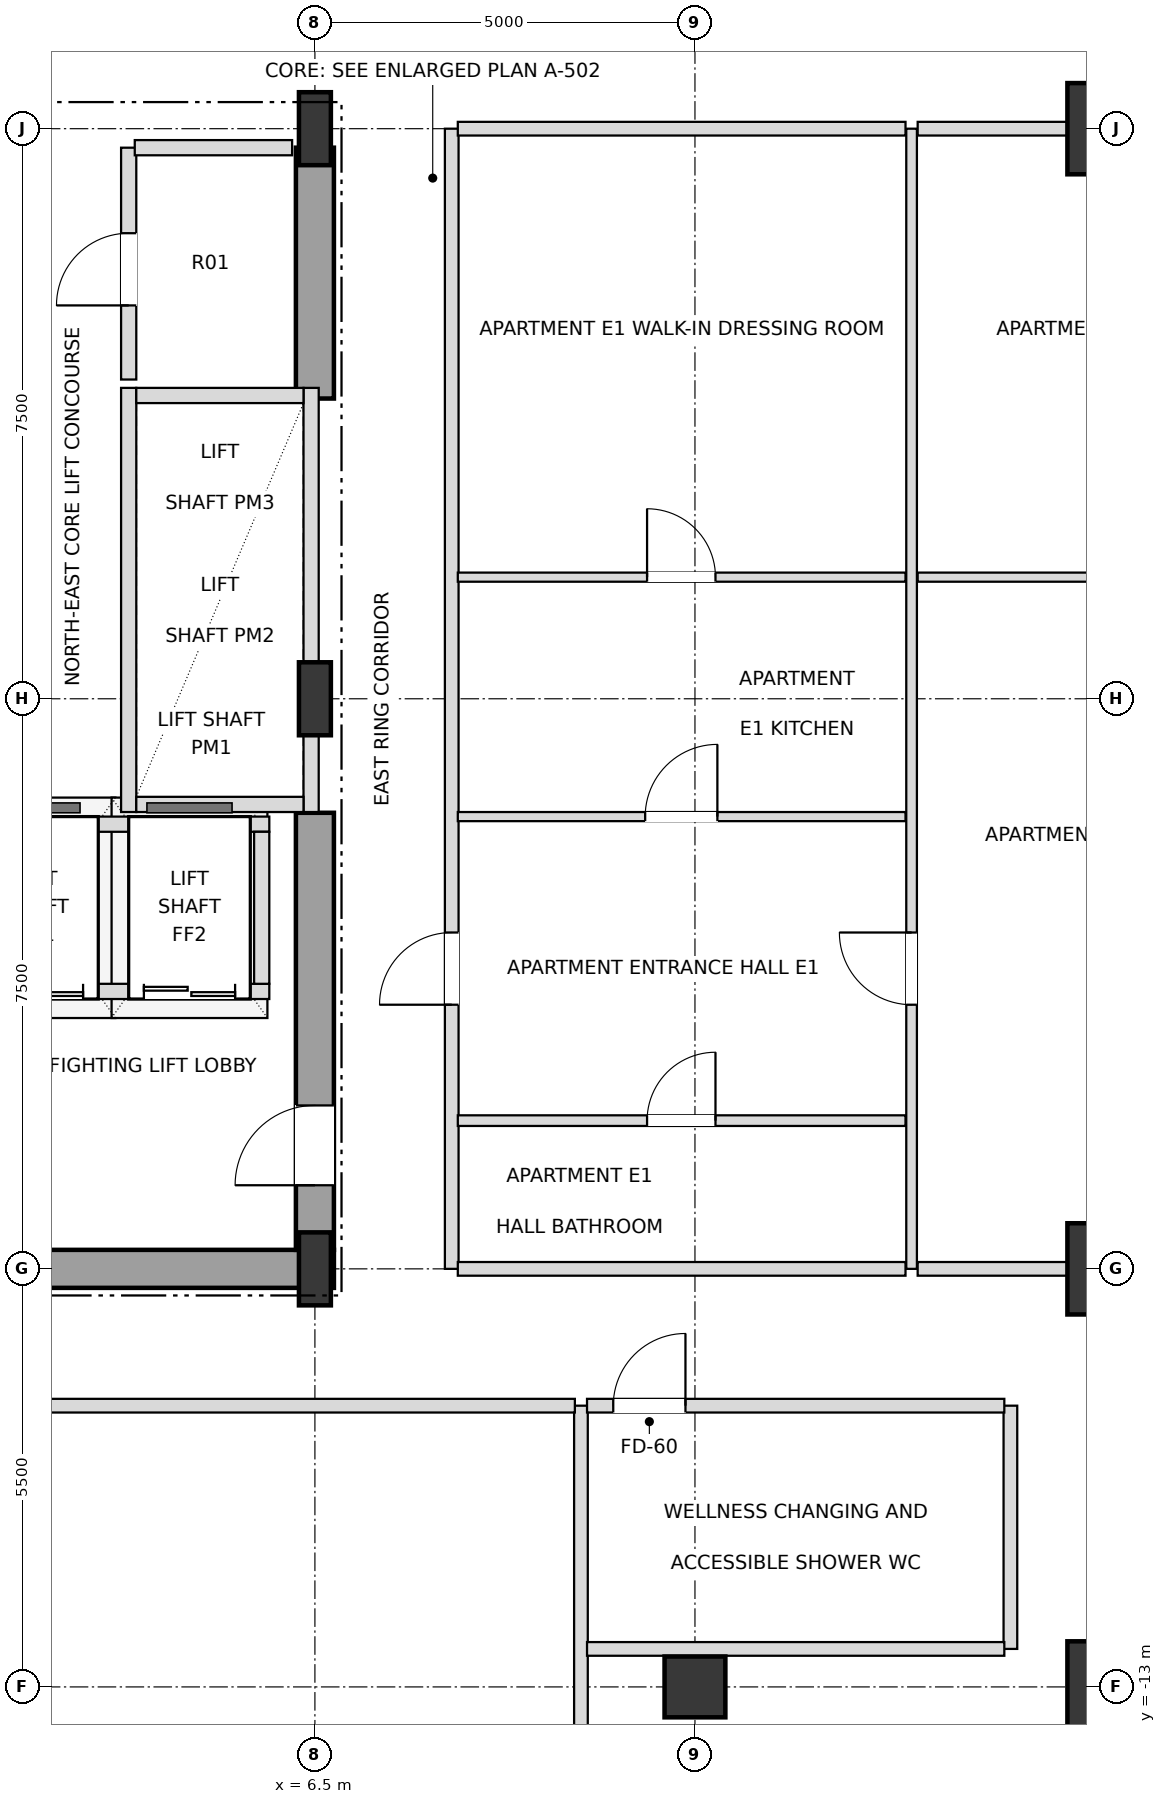
"""IFC4 building model, lengths in metres.
Left out: names, types, materials, properties, quantities, classifications, styles, units other than length and angle.
Written with IfcOpenShell. Run it as: python <this file> out.ifc"""

import sys

from ifc_helpers import new_model, si_unit, direction, frame, frame_2d, origin, origin_2d, place, context, subcontext, project, spatial, rectangle, i_section, extrude, element, fill, save


model = new_model("IFC4")
c1 = context("Model", 3, precision=1e-05, world=origin(), true_north=direction((0.0, 1.0)))
c2 = subcontext(c1, "Body", "Model", "MODEL_VIEW")
j1 = project(units=[si_unit("LENGTHUNIT", "METRE"), si_unit("PLANEANGLEUNIT", "RADIAN")], contexts=[c1])
p1 = place(None, origin())
s1 = spatial("IfcSite", under=j1, at=p1, CompositionType="ELEMENT")
p2 = place(p1, origin())
s2 = spatial("IfcBuilding", under=s1, at=p2, CompositionType="ELEMENT")
p3 = place(p2, frame((0.0, 0.0, 106.2)))
s3 = spatial("IfcBuildingStorey", under=s2, at=p3, CompositionType="ELEMENT", Elevation=106.2)
for number, where, z_axis, x_axis in (
    (1, (6.5, -7.5, 0.0), (0.0, 0.0, 1.0), (1.0, 0.0, 0.0)),
    (2, (6.5, 0.0, 0.0), (0.0, 0.0, 1.0), (1.0, 0.0, 0.0)),
    (3, (6.5, 7.5, 0.0), (0.0, 0.0, 1.0), (1.0, 0.0, 0.0)),
):
    element("IfcColumn", number, at=place(p3, frame(where, z_axis=z_axis, x_axis=x_axis)), inside=s3, PredefinedType="COLUMN", context=c2, shape_type="SweptSolid", body=[
        extrude(i_section(OverallWidth=0.42, OverallDepth=0.96, WebThickness=0.022, FlangeThickness=0.034, at=origin_2d()), origin(), (0.0, 0.0, 1.0), 3.6),
    ])
for number, where, z_axis, x_axis in (
    (4, (17.0, -13.0, 0.0), (0.0, 0.0, 1.0), (1.0, 0.0, 0.0)),
    (5, (17.0, -7.5, 0.0), (0.0, 0.0, 1.0), (1.0, 0.0, 0.0)),
    (6, (17.0, 7.5, 0.0), (0.0, 0.0, 1.0), (1.0, 0.0, 0.0)),
):
    element("IfcColumn", number, at=place(p3, frame(where, z_axis=z_axis, x_axis=x_axis)), inside=s3, PredefinedType="USERDEFINED", context=c2, shape_type="SweptSolid", body=[
        extrude(rectangle(XDim=1.2, YDim=1.2, at=origin_2d()), origin(), (0.0, 0.0, 1.0), 3.6),
    ])
p4 = place(p3, frame((11.5, -13.0, 0.0), z_axis=(0.0, 0.0, 1.0), x_axis=(1.0, 0.0, 0.0)))
e7 = element("IfcColumn", 7, at=p4, inside=s3, PredefinedType="COLUMN", context=c2, shape_type="SweptSolid", body=[
    extrude(rectangle(XDim=0.8, YDim=0.8, at=origin_2d()), origin(), (0.0, 0.0, 1.0), 3.6),
])
p5 = place(p3, frame((0.0, -7.5, 0.0), z_axis=(0.0, 0.0, 1.0), x_axis=(1.0, 0.0, 0.0)))
e8 = element("IfcWall", 8, at=p5, inside=s3, PredefinedType="SHEAR", context=c2, shape_type="SweptSolid", body=[
    extrude(rectangle(XDim=6.75, YDim=0.5, at=frame_2d((3.375, 0.0))), origin(), (0.0, 0.0, 1.0), 3.38),
])
p6 = place(p3, frame((6.5, -7.25, 0.0), z_axis=(0.0, 0.0, 1.0), x_axis=(0.0, 1.0, 0.0)))
e9 = element("IfcWall", 9, at=p6, inside=s3, PredefinedType="SHEAR", context=c2, shape_type="SweptSolid", body=[
    extrude(rectangle(XDim=5.75, YDim=0.5, at=frame_2d((2.875, 0.0))), origin(), (0.0, 0.0, 1.0), 3.38),
])
p7 = place(p6, frame((0.85, 0.0, 0.0)))
e10 = element("IfcOpeningElement", 10, at=p7, cuts=e9, PredefinedType="OPENING", context=c2, shape_type="SweptSolid", body=[
    extrude(rectangle(XDim=1.05, YDim=2.15, at=frame_2d((0.525, 1.075))), frame((0.0, 0.26, 0.0), z_axis=(0.0, -1.0, 0.0), x_axis=(1.0, 0.0, 0.0)), (0.0, 0.0, 1.0), 0.52),
])
p8 = place(p3, frame((6.5, 3.95, 0.0), z_axis=(0.0, 0.0, 1.0), x_axis=(0.0, 1.0, 0.0)))
e11 = element("IfcWall", 11, at=p8, inside=s3, PredefinedType="SHEAR", context=c2, shape_type="SweptSolid", body=[
    extrude(rectangle(XDim=3.3, YDim=0.5, at=frame_2d((1.65, 0.0))), origin(), (0.0, 0.0, 1.0), 3.38),
])
p9 = place(p3, frame((4.05, -1.49, 0.0), z_axis=(0.0, 0.0, 1.0), x_axis=(0.0, 1.0, 0.0)))
e12 = element("IfcWall", 12, at=p9, inside=s3, PredefinedType="SOLIDWALL", context=c2, shape_type="SweptSolid", body=[
    extrude(rectangle(XDim=5.58, YDim=0.2, at=frame_2d((2.79, 0.0))), origin(), (0.0, 0.0, 1.0), 3.38),
])
p10 = place(p3, frame((6.45, -1.49, 0.0), z_axis=(0.0, 0.0, 1.0), x_axis=(0.0, 1.0, 0.0)))
e13 = element("IfcWall", 13, at=p10, inside=s3, PredefinedType="SOLIDWALL", context=c2, shape_type="SweptSolid", body=[
    extrude(rectangle(XDim=5.58, YDim=0.2, at=frame_2d((2.79, 0.0))), origin(), (0.0, 0.0, 1.0), 2.816),
])
for number, where, z_axis, x_axis in (
    (14, (4.15, -1.39, 0.0), (0.0, 0.0, 1.0), (1.0, 0.0, 0.0)),
    (15, (4.15, 3.99, 0.0), (0.0, 0.0, 1.0), (1.0, 0.0, 0.0)),
):
    element("IfcWall", number, at=place(p3, frame(where, z_axis=z_axis, x_axis=x_axis)), inside=s3, PredefinedType="SOLIDWALL", context=c2, shape_type="SweptSolid", body=[
        extrude(rectangle(XDim=2.2, YDim=0.2, at=frame_2d((1.1, 0.0))), origin(), (0.0, 0.0, 1.0), 3.38),
    ])
p11 = place(p3, frame((1.8, -3.85, 0.0), z_axis=(0.0, 0.0, 1.0), x_axis=(1.0, 0.0, 0.0)))
e16 = element("IfcWall", 16, at=p11, inside=s3, PredefinedType="SOLIDWALL", context=c2, shape_type="SweptSolid", body=[
    extrude(rectangle(XDim=4.1, YDim=0.2, at=frame_2d((2.05, 0.0))), origin(), (0.0, 0.0, 1.0), 3.38),
])
p12 = place(p11, frame((0.45, 0.0, 0.0)))
e17 = element("IfcOpeningElement", 17, at=p12, cuts=e16, PredefinedType="OPENING", context=c2, shape_type="SweptSolid", body=[
    extrude(rectangle(XDim=1.2, YDim=2.2, at=frame_2d((0.6, 1.1))), frame((0.0, 0.11, 0.0), z_axis=(0.0, -1.0, 0.0), x_axis=(1.0, 0.0, 0.0)), (0.0, 0.0, 1.0), 0.22),
])
p13 = place(p11, frame((2.45, 0.0, 0.0)))
e18 = element("IfcOpeningElement", 18, at=p13, cuts=e16, PredefinedType="OPENING", context=c2, shape_type="SweptSolid", body=[
    extrude(rectangle(XDim=1.2, YDim=2.2, at=frame_2d((0.6, 1.1))), frame((0.0, 0.11, 0.0), z_axis=(0.0, -1.0, 0.0), x_axis=(1.0, 0.0, 0.0)), (0.0, 0.0, 1.0), 0.22),
])
p14 = place(p3, frame((1.8, -1.65, 0.0), z_axis=(0.0, 0.0, 1.0), x_axis=(1.0, 0.0, 0.0)))
e19 = element("IfcWall", 19, at=p14, inside=s3, PredefinedType="SOLIDWALL", context=c2, shape_type="SweptSolid", body=[
    extrude(rectangle(XDim=4.1, YDim=0.2, at=frame_2d((2.05, 0.0))), origin(), (0.0, 0.0, 1.0), 3.38),
])
p15 = place(p3, frame((5.8, -3.75, 0.0), z_axis=(0.0, 0.0, 1.0), x_axis=(0.0, 1.0, 0.0)))
e20 = element("IfcWall", 20, at=p15, inside=s3, PredefinedType="SOLIDWALL", context=c2, shape_type="SweptSolid", body=[
    extrude(rectangle(XDim=2.0, YDim=0.2, at=frame_2d((1.0, 0.0))), origin(), (0.0, 0.0, 1.0), 3.38),
])
p16 = place(p3, frame((4.05, 4.2, 0.0), z_axis=(0.0, 0.0, 1.0), x_axis=(0.0, 1.0, 0.0)))
e21 = element("IfcWall", 21, at=p16, inside=s3, PredefinedType="SOLIDWALL", context=c2, shape_type="SweptSolid", body=[
    extrude(rectangle(XDim=3.05, YDim=0.2, at=frame_2d((1.525, 0.0))), origin(), (0.0, 0.0, 1.0), 3.38),
])
p17 = place(p16, frame((0.975, 0.0, 0.0)))
e22 = element("IfcOpeningElement", 22, at=p17, cuts=e21, PredefinedType="OPENING", context=c2, shape_type="SweptSolid", body=[
    extrude(rectangle(XDim=0.95, YDim=2.15, at=frame_2d((0.475, 1.075))), frame((0.0, 0.11, 0.0), z_axis=(0.0, -1.0, 0.0), x_axis=(1.0, 0.0, 0.0)), (0.0, 0.0, 1.0), 0.22),
])
p18 = place(p3, frame((8.3, -7.5, 0.0), z_axis=(0.0, 0.0, 1.0), x_axis=(0.0, 1.0, 0.0)))
e23 = element("IfcWall", 23, at=p18, inside=s3, PredefinedType="PARTITIONING", context=c2, shape_type="SweptSolid", body=[
    extrude(rectangle(XDim=15.0, YDim=0.18, at=frame_2d((7.5, 0.0))), origin(), (0.0, 0.0, 1.0), 3.38),
])
p19 = place(p18, frame((3.475, 0.0, 0.0)))
e24 = element("IfcOpeningElement", 24, at=p19, cuts=e23, PredefinedType="OPENING", context=c2, shape_type="SweptSolid", body=[
    extrude(rectangle(XDim=0.95, YDim=2.15, at=frame_2d((0.475, 1.075))), frame((0.0, 0.1, 0.0), z_axis=(0.0, -1.0, 0.0), x_axis=(1.0, 0.0, 0.0)), (0.0, 0.0, 1.0), 0.2),
])
p20 = place(p3, frame((10.0, -23.15, 0.0), z_axis=(0.0, 0.0, 1.0), x_axis=(0.0, 1.0, 0.0)))
e25 = element("IfcWall", 25, at=p20, inside=s3, PredefinedType="PARTITIONING", context=c2, shape_type="SweptSolid", body=[
    extrude(rectangle(XDim=13.85, YDim=0.18, at=frame_2d((6.925, 0.0))), origin(), (0.0, 0.0, 1.0), 2.816),
])
p21 = place(p20, frame((4.855, 0.0, 0.0)))
e26 = element("IfcOpeningElement", 26, at=p21, cuts=e25, PredefinedType="OPENING", context=c2, shape_type="SweptSolid", body=[
    extrude(rectangle(XDim=0.95, YDim=2.15, at=frame_2d((0.475, 1.075))), frame((0.0, 0.1, 0.0), z_axis=(0.0, -1.0, 0.0), x_axis=(1.0, 0.0, 0.0)), (0.0, 0.0, 1.0), 0.2),
])
p22 = place(p3, frame((14.35, -7.5, 0.0), z_axis=(0.0, 0.0, 1.0), x_axis=(0.0, 1.0, 0.0)))
e27 = element("IfcWall", 27, at=p22, inside=s3, PredefinedType="PARTITIONING", context=c2, shape_type="SweptSolid", body=[
    extrude(rectangle(XDim=15.0, YDim=0.14, at=frame_2d((7.5, 0.0))), origin(), (0.0, 0.0, 1.0), 3.38),
])
p23 = place(p22, frame((3.475, 0.0, 0.0)))
e28 = element("IfcOpeningElement", 28, at=p23, cuts=e27, PredefinedType="OPENING", context=c2, shape_type="SweptSolid", body=[
    extrude(rectangle(XDim=0.95, YDim=2.1, at=frame_2d((0.475, 1.05))), frame((0.0, 0.08, 0.0), z_axis=(0.0, -1.0, 0.0), x_axis=(1.0, 0.0, 0.0)), (0.0, 0.0, 1.0), 0.16),
])
p24 = place(p3, frame((15.65, -12.5, 0.0), z_axis=(0.0, 0.0, 1.0), x_axis=(0.0, 1.0, 0.0)))
e29 = element("IfcWall", 29, at=p24, inside=s3, PredefinedType="PARTITIONING", context=c2, shape_type="SweptSolid", body=[
    extrude(rectangle(XDim=3.2, YDim=0.18, at=frame_2d((1.6, 0.0))), origin(), (0.0, 0.0, 1.0), 3.38),
])
p25 = place(p3, frame((10.08, -12.5, 0.0), z_axis=(0.0, 0.0, 1.0), x_axis=(1.0, 0.0, 0.0)))
e30 = element("IfcWall", 30, at=p25, inside=s3, PredefinedType="PARTITIONING", context=c2, shape_type="SweptSolid", body=[
    extrude(rectangle(XDim=5.49, YDim=0.18, at=frame_2d((2.745, 0.0))), origin(), (0.0, 0.0, 1.0), 3.38),
])
p26 = place(p3, frame((-4.92, -9.3, 0.0), z_axis=(0.0, 0.0, 1.0), x_axis=(1.0, 0.0, 0.0)))
e31 = element("IfcWall", 31, at=p26, inside=s3, PredefinedType="PARTITIONING", context=c2, shape_type="SweptSolid", body=[
    extrude(rectangle(XDim=14.84, YDim=0.18, at=frame_2d((7.42, 0.0))), origin(), (0.0, 0.0, 1.0), 2.816),
])
p27 = place(p26, frame((6.945, 0.0, 0.0)))
e32 = element("IfcOpeningElement", 32, at=p27, cuts=e31, PredefinedType="OPENING", context=c2, shape_type="SweptSolid", body=[
    extrude(rectangle(XDim=0.95, YDim=2.15, at=frame_2d((0.475, 1.075))), frame((0.0, 0.1, 0.0), z_axis=(0.0, -1.0, 0.0), x_axis=(1.0, 0.0, 0.0)), (0.0, 0.0, 1.0), 0.2),
])
p28 = place(p3, frame((10.08, -9.3, 0.0), z_axis=(0.0, 0.0, 1.0), x_axis=(1.0, 0.0, 0.0)))
e33 = element("IfcWall", 33, at=p28, inside=s3, PredefinedType="PARTITIONING", context=c2, shape_type="SweptSolid", body=[
    extrude(rectangle(XDim=5.49, YDim=0.18, at=frame_2d((2.745, 0.0))), origin(), (0.0, 0.0, 1.0), 3.38),
])
p29 = place(p28, frame((0.345, 0.0, 0.0)))
e34 = element("IfcOpeningElement", 34, at=p29, cuts=e33, PredefinedType="OPENING", context=c2, shape_type="SweptSolid", body=[
    extrude(rectangle(XDim=0.95, YDim=2.15, at=frame_2d((0.475, 1.075))), frame((0.0, 0.1, 0.0), z_axis=(0.0, -1.0, 0.0), x_axis=(1.0, 0.0, 0.0)), (0.0, 0.0, 1.0), 0.2),
])
p30 = place(p3, frame((8.38, -7.5, 0.0), z_axis=(0.0, 0.0, 1.0), x_axis=(1.0, 0.0, 0.0)))
e35 = element("IfcWall", 35, at=p30, inside=s3, PredefinedType="PARTITIONING", context=c2, shape_type="SweptSolid", body=[
    extrude(rectangle(XDim=5.89, YDim=0.18, at=frame_2d((2.945, 0.0))), origin(), (0.0, 0.0, 1.0), 2.816),
])
p31 = place(p3, frame((14.43, -7.5, 0.0), z_axis=(0.0, 0.0, 1.0), x_axis=(1.0, 0.0, 0.0)))
e36 = element("IfcWall", 36, at=p31, inside=s3, PredefinedType="PARTITIONING", context=c2, shape_type="SweptSolid", body=[
    extrude(rectangle(XDim=5.72, YDim=0.18, at=frame_2d((2.86, 0.0))), origin(), (0.0, 0.0, 1.0), 2.816),
])
p32 = place(p3, frame((8.38, -5.55, 0.0), z_axis=(0.0, 0.0, 1.0), x_axis=(1.0, 0.0, 0.0)))
e37 = element("IfcWall", 37, at=p32, inside=s3, PredefinedType="PARTITIONING", context=c2, shape_type="SweptSolid", body=[
    extrude(rectangle(XDim=5.89, YDim=0.14, at=frame_2d((2.945, 0.0))), origin(), (0.0, 0.0, 1.0), 3.38),
])
p33 = place(p32, frame((2.49, 0.0, 0.0)))
e38 = element("IfcOpeningElement", 38, at=p33, cuts=e37, PredefinedType="OPENING", context=c2, shape_type="SweptSolid", body=[
    extrude(rectangle(XDim=0.9, YDim=2.1, at=frame_2d((0.45, 1.05))), frame((0.0, 0.08, 0.0), z_axis=(0.0, -1.0, 0.0), x_axis=(1.0, 0.0, 0.0)), (0.0, 0.0, 1.0), 0.16),
])
p34 = place(p3, frame((8.38, -1.55, 0.0), z_axis=(0.0, 0.0, 1.0), x_axis=(1.0, 0.0, 0.0)))
e39 = element("IfcWall", 39, at=p34, inside=s3, PredefinedType="PARTITIONING", context=c2, shape_type="SweptSolid", body=[
    extrude(rectangle(XDim=5.89, YDim=0.12, at=frame_2d((2.945, 0.0))), origin(), (0.0, 0.0, 1.0), 3.38),
])
p35 = place(p34, frame((2.465, 0.0, 0.0)))
e40 = element("IfcOpeningElement", 40, at=p35, cuts=e39, PredefinedType="OPENING", context=c2, shape_type="SweptSolid", body=[
    extrude(rectangle(XDim=0.95, YDim=2.1, at=frame_2d((0.475, 1.05))), frame((0.0, 0.07, 0.0), z_axis=(0.0, -1.0, 0.0), x_axis=(1.0, 0.0, 0.0)), (0.0, 0.0, 1.0), 0.14),
])
p36 = place(p3, frame((8.38, 1.6, 0.0), z_axis=(0.0, 0.0, 1.0), x_axis=(1.0, 0.0, 0.0)))
e41 = element("IfcWall", 41, at=p36, inside=s3, PredefinedType="PARTITIONING", context=c2, shape_type="SweptSolid", body=[
    extrude(rectangle(XDim=5.89, YDim=0.12, at=frame_2d((2.945, 0.0))), origin(), (0.0, 0.0, 1.0), 3.38),
])
p37 = place(p36, frame((2.49, 0.0, 0.0)))
e42 = element("IfcOpeningElement", 42, at=p37, cuts=e41, PredefinedType="OPENING", context=c2, shape_type="SweptSolid", body=[
    extrude(rectangle(XDim=0.9, YDim=2.1, at=frame_2d((0.45, 1.05))), frame((0.0, 0.07, 0.0), z_axis=(0.0, -1.0, 0.0), x_axis=(1.0, 0.0, 0.0)), (0.0, 0.0, 1.0), 0.14),
])
p38 = place(p3, frame((14.43, 1.6, 0.0), z_axis=(0.0, 0.0, 1.0), x_axis=(1.0, 0.0, 0.0)))
e43 = element("IfcWall", 43, at=p38, inside=s3, PredefinedType="PARTITIONING", context=c2, shape_type="SweptSolid", body=[
    extrude(rectangle(XDim=5.64, YDim=0.12, at=frame_2d((2.82, 0.0))), origin(), (0.0, 0.0, 1.0), 2.816),
])
p39 = place(p38, frame((2.37, 0.0, 0.0)))
e44 = element("IfcOpeningElement", 44, at=p39, cuts=e43, PredefinedType="OPENING", context=c2, shape_type="SweptSolid", body=[
    extrude(rectangle(XDim=0.9, YDim=2.1, at=frame_2d((0.45, 1.05))), frame((0.0, 0.07, 0.0), z_axis=(0.0, -1.0, 0.0), x_axis=(1.0, 0.0, 0.0)), (0.0, 0.0, 1.0), 0.14),
])
p40 = place(p3, frame((4.13, 7.25, 0.0), z_axis=(0.0, 0.0, 1.0), x_axis=(1.0, 0.0, 0.0)))
e45 = element("IfcWall", 45, at=p40, inside=s3, PredefinedType="SOLIDWALL", context=c2, shape_type="SweptSolid", body=[
    extrude(rectangle(XDim=2.07, YDim=0.2, at=frame_2d((1.035, 0.0))), origin(), (0.0, 0.0, 1.0), 3.38),
])
p41 = place(p3, frame((8.38, 7.5, 0.0), z_axis=(0.0, 0.0, 1.0), x_axis=(1.0, 0.0, 0.0)))
e46 = element("IfcWall", 46, at=p41, inside=s3, PredefinedType="PARTITIONING", context=c2, shape_type="SweptSolid", body=[
    extrude(rectangle(XDim=5.89, YDim=0.18, at=frame_2d((2.945, 0.0))), origin(), (0.0, 0.0, 1.0), 2.816),
])
p42 = place(p3, frame((14.43, 7.5, 0.0), z_axis=(0.0, 0.0, 1.0), x_axis=(1.0, 0.0, 0.0)))
e47 = element("IfcWall", 47, at=p42, inside=s3, PredefinedType="PARTITIONING", context=c2, shape_type="SweptSolid", body=[
    extrude(rectangle(XDim=5.72, YDim=0.18, at=frame_2d((2.86, 0.0))), origin(), (0.0, 0.0, 1.0), 2.816),
])
p43 = place(p7, origin())
e48 = element("IfcDoor", 48, at=p43, inside=s3, OperationType="SINGLE_SWING_LEFT", PredefinedType="DOOR", context=c2, shape_type="SweptSolid", body=[
    extrude(rectangle(XDim=1.05, YDim=2.15, at=frame_2d((0.525, 1.075))), frame((0.0, 0.025, 0.0), z_axis=(0.0, -1.0, 0.0), x_axis=(1.0, 0.0, 0.0)), (0.0, 0.0, 1.0), 0.05),
])
fill(e10, e48)
p44 = place(p12, origin())
e49 = element("IfcDoor", 49, at=p44, inside=s3, OperationType="DOUBLE_DOOR_SLIDING", PredefinedType="DOOR", context=c2, shape_type="SweptSolid", body=[
    extrude(rectangle(XDim=1.2, YDim=2.2, at=frame_2d((0.6, 1.1))), frame((0.0, 0.025, 0.0), z_axis=(0.0, -1.0, 0.0), x_axis=(1.0, 0.0, 0.0)), (0.0, 0.0, 1.0), 0.05),
])
fill(e17, e49)
p45 = place(p13, origin())
e50 = element("IfcDoor", 50, at=p45, inside=s3, OperationType="DOUBLE_DOOR_SLIDING", PredefinedType="DOOR", context=c2, shape_type="SweptSolid", body=[
    extrude(rectangle(XDim=1.2, YDim=2.2, at=frame_2d((0.6, 1.1))), frame((0.0, 0.025, 0.0), z_axis=(0.0, -1.0, 0.0), x_axis=(1.0, 0.0, 0.0)), (0.0, 0.0, 1.0), 0.05),
])
fill(e18, e50)
p46 = place(p17, origin())
e51 = element("IfcDoor", 51, at=p46, inside=s3, OperationType="SINGLE_SWING_LEFT", PredefinedType="DOOR", context=c2, shape_type="SweptSolid", body=[
    extrude(rectangle(XDim=0.95, YDim=2.15, at=frame_2d((0.475, 1.075))), frame((0.0, 0.025, 0.0), z_axis=(0.0, -1.0, 0.0), x_axis=(1.0, 0.0, 0.0)), (0.0, 0.0, 1.0), 0.05),
])
fill(e22, e51)
p47 = place(p29, origin())
e52 = element("IfcDoor", 52, at=p47, inside=s3, OperationType="SINGLE_SWING_RIGHT", PredefinedType="DOOR", context=c2, shape_type="SweptSolid", body=[
    extrude(rectangle(XDim=0.95, YDim=2.15, at=frame_2d((0.475, 1.075))), frame((0.0, 0.025, 0.0), z_axis=(0.0, -1.0, 0.0), x_axis=(1.0, 0.0, 0.0)), (0.0, 0.0, 1.0), 0.05),
])
fill(e34, e52)
p48 = place(p33, origin())
e53 = element("IfcDoor", 53, at=p48, inside=s3, OperationType="SINGLE_SWING_RIGHT", PredefinedType="DOOR", context=c2, shape_type="SweptSolid", body=[
    extrude(rectangle(XDim=0.9, YDim=2.1, at=frame_2d((0.45, 1.05))), frame((0.0, 0.025, 0.0), z_axis=(0.0, -1.0, 0.0), x_axis=(1.0, 0.0, 0.0)), (0.0, 0.0, 1.0), 0.05),
])
fill(e38, e53)
p49 = place(p19, origin())
e54 = element("IfcDoor", 54, at=p49, inside=s3, OperationType="SINGLE_SWING_LEFT", PredefinedType="DOOR", context=c2, shape_type="SweptSolid", body=[
    extrude(rectangle(XDim=0.95, YDim=2.15, at=frame_2d((0.475, 1.075))), frame((0.0, 0.025, 0.0), z_axis=(0.0, -1.0, 0.0), x_axis=(1.0, 0.0, 0.0)), (0.0, 0.0, 1.0), 0.05),
])
fill(e24, e54)
p50 = place(p35, origin())
e55 = element("IfcDoor", 55, at=p50, inside=s3, OperationType="SINGLE_SWING_RIGHT", PredefinedType="DOOR", context=c2, shape_type="SweptSolid", body=[
    extrude(rectangle(XDim=0.95, YDim=2.1, at=frame_2d((0.475, 1.05))), frame((0.0, 0.025, 0.0), z_axis=(0.0, -1.0, 0.0), x_axis=(1.0, 0.0, 0.0)), (0.0, 0.0, 1.0), 0.05),
])
fill(e40, e55)
p51 = place(p37, origin())
e56 = element("IfcDoor", 56, at=p51, inside=s3, OperationType="SINGLE_SWING_LEFT", PredefinedType="DOOR", context=c2, shape_type="SweptSolid", body=[
    extrude(rectangle(XDim=0.9, YDim=2.1, at=frame_2d((0.45, 1.05))), frame((0.0, 0.025, 0.0), z_axis=(0.0, -1.0, 0.0), x_axis=(1.0, 0.0, 0.0)), (0.0, 0.0, 1.0), 0.05),
])
fill(e42, e56)
p52 = place(p23, origin())
e57 = element("IfcDoor", 57, at=p52, inside=s3, OperationType="SINGLE_SWING_RIGHT", PredefinedType="DOOR", context=c2, shape_type="SweptSolid", body=[
    extrude(rectangle(XDim=0.95, YDim=2.1, at=frame_2d((0.475, 1.05))), frame((0.0, 0.025, 0.0), z_axis=(0.0, -1.0, 0.0), x_axis=(1.0, 0.0, 0.0)), (0.0, 0.0, 1.0), 0.05),
])
fill(e28, e57)
save(model, sys.argv[1])
